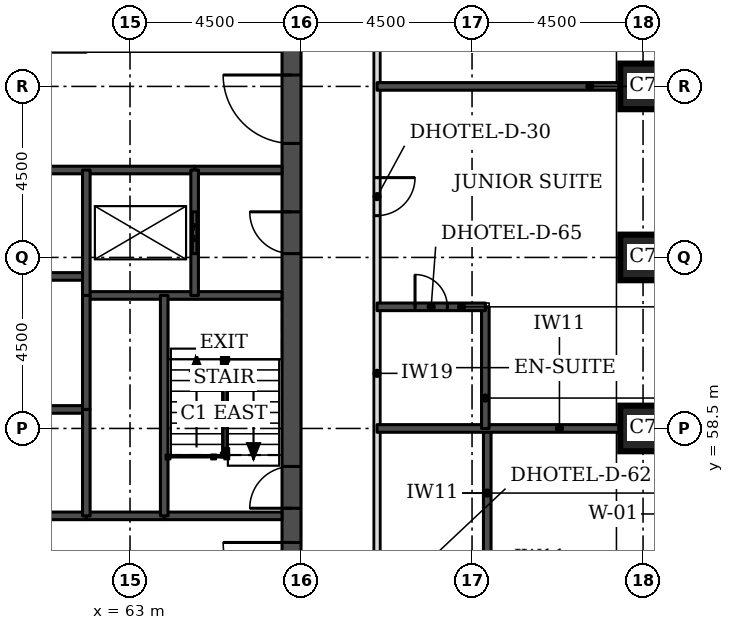
"""IFC4 building model, lengths in metres.
Left out: names, types, materials, properties, quantities, classifications, styles, units other than length and angle.
Written with IfcOpenShell. Run it as: python <this file> out.ifc"""

import sys

from ifc_helpers import new_model, si_unit, direction, frame, frame_2d, origin, origin_2d, place, context, subcontext, project, spatial, rectangle, extrude, element, fill, save


model = new_model("IFC4")
c1 = context("Model", 3, precision=1e-05, world=origin(), true_north=direction((0.0, 1.0)))
c2 = subcontext(c1, "Body", "Model", "MODEL_VIEW")
j1 = project(units=[si_unit("LENGTHUNIT", "METRE"), si_unit("PLANEANGLEUNIT", "RADIAN")], contexts=[c1])
p1 = place(None, origin())
s1 = spatial("IfcSite", under=j1, at=p1, CompositionType="ELEMENT")
p2 = place(p1, origin())
s2 = spatial("IfcBuilding", under=s1, at=p2, CompositionType="ELEMENT")
p3 = place(p2, frame((0.0, 0.0, 59.4)))
s3 = spatial("IfcBuildingStorey", under=s2, at=p3, CompositionType="ELEMENT", Elevation=59.4)
for number, where, z_axis, x_axis in (
    (1, (76.5, 58.5, 0.0), (0.0, 0.0, 1.0), (1.0, 0.0, 0.0)),
    (2, (76.5, 63.0, 0.0), (0.0, 0.0, 1.0), (1.0, 0.0, 0.0)),
    (3, (76.5, 67.5, 0.0), (0.0, 0.0, 1.0), (1.0, 0.0, 0.0)),
):
    element("IfcColumn", number, at=place(p3, frame(where, z_axis=z_axis, x_axis=x_axis)), inside=s3, PredefinedType="COLUMN", context=c2, shape_type="SweptSolid", body=[
        extrude(rectangle(XDim=1.2, YDim=1.2, at=origin_2d()), origin(), (0.0, 0.0, 1.0), 3.3),
    ])
p4 = place(p3, frame((67.25, 49.5, 0.0), z_axis=(0.0, 0.0, 1.0), x_axis=(0.0, 1.0, 0.0)))
e4 = element("IfcWall", 4, at=p4, inside=s3, PredefinedType="SHEAR", context=c2, shape_type="SweptSolid", body=[
    extrude(rectangle(XDim=22.5, YDim=0.5, at=frame_2d((11.25, 0.0))), origin(), (0.0, 0.0, 1.0), 3.3),
])
p5 = place(p4, frame((4.2, 0.0, 0.0)))
e5 = element("IfcOpeningElement", 5, at=p5, cuts=e4, PredefinedType="OPENING", context=c2, shape_type="SweptSolid", body=[
    extrude(rectangle(XDim=1.8, YDim=2.1, at=frame_2d((0.9, 1.05))), frame((0.0, 0.26, 0.0), z_axis=(0.0, -1.0, 0.0), x_axis=(1.0, 0.0, 0.0)), (0.0, 0.0, 1.0), 0.52),
])
p6 = place(p4, frame((6.9, 0.0, 0.0)))
e6 = element("IfcOpeningElement", 6, at=p6, cuts=e4, PredefinedType="OPENING", context=c2, shape_type="SweptSolid", body=[
    extrude(rectangle(XDim=1.1, YDim=2.1, at=frame_2d((0.55, 1.05))), frame((0.0, 0.26, 0.0), z_axis=(0.0, -1.0, 0.0), x_axis=(1.0, 0.0, 0.0)), (0.0, 0.0, 1.0), 0.52),
])
p7 = place(p4, frame((13.6, 0.0, 0.0)))
e7 = element("IfcOpeningElement", 7, at=p7, cuts=e4, PredefinedType="OPENING", context=c2, shape_type="SweptSolid", body=[
    extrude(rectangle(XDim=1.1, YDim=2.1, at=frame_2d((0.55, 1.05))), frame((0.0, 0.26, 0.0), z_axis=(0.0, -1.0, 0.0), x_axis=(1.0, 0.0, 0.0)), (0.0, 0.0, 1.0), 0.52),
])
p8 = place(p4, frame((16.5, 0.0, 0.0)))
e8 = element("IfcOpeningElement", 8, at=p8, cuts=e4, PredefinedType="OPENING", context=c2, shape_type="SweptSolid", body=[
    extrude(rectangle(XDim=1.8, YDim=2.1, at=frame_2d((0.9, 1.05))), frame((0.0, 0.26, 0.0), z_axis=(0.0, -1.0, 0.0), x_axis=(1.0, 0.0, 0.0)), (0.0, 0.0, 1.0), 0.52),
])
p9 = place(p3, frame((69.5, 47.5, 0.0), z_axis=(0.0, 0.0, 1.0), x_axis=(0.0, 1.0, 0.0)))
e9 = element("IfcWall", 9, at=p9, inside=s3, PredefinedType="PARTITIONING", context=c2, shape_type="SweptSolid", body=[
    extrude(rectangle(XDim=26.5, YDim=0.15, at=frame_2d((13.25, 0.0))), origin(), (0.0, 0.0, 1.0), 3.08),
])
p10 = place(p9, frame((22.65, 0.0, 0.0)))
e10 = element("IfcOpeningElement", 10, at=p10, cuts=e9, PredefinedType="OPENING", context=c2, shape_type="SweptSolid", body=[
    extrude(rectangle(XDim=1.0, YDim=2.1, at=frame_2d((0.5, 1.05))), frame((0.0, 0.085, 0.0), z_axis=(0.0, -1.0, 0.0), x_axis=(1.0, 0.0, 0.0)), (0.0, 0.0, 1.0), 0.17),
])
p11 = place(p9, frame((16.6, 0.0, 0.0)))
e11 = element("IfcOpeningElement", 11, at=p11, cuts=e9, PredefinedType="OPENING", context=c2, shape_type="SweptSolid", body=[
    extrude(rectangle(XDim=1.0, YDim=2.1, at=frame_2d((0.5, 1.05))), frame((0.0, 0.085, 0.0), z_axis=(0.0, -1.0, 0.0), x_axis=(1.0, 0.0, 0.0)), (0.0, 0.0, 1.0), 0.17),
])
p12 = place(p9, frame((4.25, 0.0, 0.0)))
e12 = element("IfcOpeningElement", 12, at=p12, cuts=e9, PredefinedType="OPENING", context=c2, shape_type="SweptSolid", body=[
    extrude(rectangle(XDim=1.1, YDim=2.1, at=frame_2d((0.55, 1.05))), frame((0.0, 0.085, 0.0), z_axis=(0.0, -1.0, 0.0), x_axis=(1.0, 0.0, 0.0)), (0.0, 0.0, 1.0), 0.17),
])
p13 = place(p9, frame((0.55, 0.0, 0.0)))
e13 = element("IfcOpeningElement", 13, at=p13, cuts=e9, PredefinedType="OPENING", context=c2, shape_type="SweptSolid", body=[
    extrude(rectangle(XDim=1.0, YDim=2.1, at=frame_2d((0.5, 1.05))), frame((0.0, 0.085, 0.0), z_axis=(0.0, -1.0, 0.0), x_axis=(1.0, 0.0, 0.0)), (0.0, 0.0, 1.0), 0.17),
])
p14 = place(p3, frame((72.4, 55.1, 0.0), z_axis=(0.0, 0.0, 1.0), x_axis=(0.0, 1.0, 0.0)))
e14 = element("IfcWall", 14, at=p14, inside=s3, PredefinedType="SOLIDWALL", context=c2, shape_type="SweptSolid", body=[
    extrude(rectangle(XDim=3.4, YDim=0.2, at=frame_2d((1.7, 0.0))), origin(), (0.0, 0.0, 1.0), 3.08),
])
p15 = place(p3, frame((69.5, 58.5, 0.0), z_axis=(0.0, 0.0, 1.0), x_axis=(1.0, 0.0, 0.0)))
e15 = element("IfcWall", 15, at=p15, inside=s3, PredefinedType="SOLIDWALL", context=c2, shape_type="SweptSolid", body=[
    extrude(rectangle(XDim=6.4, YDim=0.2, at=frame_2d((3.2, 0.0))), origin(), (0.0, 0.0, 1.0), 3.08),
])
p16 = place(p3, frame((72.35, 58.5, 0.0), z_axis=(0.0, 0.0, 1.0), x_axis=(0.0, 1.0, 0.0)))
e16 = element("IfcWall", 16, at=p16, inside=s3, PredefinedType="SOLIDWALL", context=c2, shape_type="SweptSolid", body=[
    extrude(rectangle(XDim=3.2, YDim=0.2, at=frame_2d((1.6, 0.0))), origin(), (0.0, 0.0, 1.0), 3.08),
])
p17 = place(p3, frame((69.5, 61.7, 0.0), z_axis=(0.0, 0.0, 1.0), x_axis=(1.0, 0.0, 0.0)))
e17 = element("IfcWall", 17, at=p17, inside=s3, PredefinedType="SOLIDWALL", context=c2, shape_type="SweptSolid", body=[
    extrude(rectangle(XDim=2.85, YDim=0.2, at=frame_2d((1.425, 0.0))), origin(), (0.0, 0.0, 1.0), 3.08),
])
p18 = place(p17, frame((1.0, 0.0, 0.0)))
e18 = element("IfcOpeningElement", 18, at=p18, cuts=e17, PredefinedType="OPENING", context=c2, shape_type="SweptSolid", body=[
    extrude(rectangle(XDim=0.85, YDim=2.1, at=frame_2d((0.425, 1.05))), frame((0.0, 0.11, 0.0), z_axis=(0.0, -1.0, 0.0), x_axis=(1.0, 0.0, 0.0)), (0.0, 0.0, 1.0), 0.22),
])
p19 = place(p3, frame((69.5, 67.5, 0.0), z_axis=(0.0, 0.0, 1.0), x_axis=(1.0, 0.0, 0.0)))
e19 = element("IfcWall", 19, at=p19, inside=s3, PredefinedType="SOLIDWALL", context=c2, shape_type="SweptSolid", body=[
    extrude(rectangle(XDim=6.4, YDim=0.2, at=frame_2d((3.2, 0.0))), origin(), (0.0, 0.0, 1.0), 3.08),
])
p20 = place(p3, frame((61.85, 56.2, 0.0), z_axis=(0.0, 0.0, 1.0), x_axis=(1.0, 0.0, 0.0)))
e20 = element("IfcWall", 20, at=p20, inside=s3, PredefinedType="SOLIDWALL", context=c2, shape_type="SweptSolid", body=[
    extrude(rectangle(XDim=2.05, YDim=0.2, at=frame_2d((1.025, 0.0))), origin(), (0.0, 0.0, 1.0), 3.08),
])
p21 = place(p3, frame((50.65, 56.2, 0.0), z_axis=(0.0, 0.0, 1.0), x_axis=(1.0, 0.0, 0.0)))
e21 = element("IfcWall", 21, at=p21, inside=s3, PredefinedType="SOLIDWALL", context=c2, shape_type="SweptSolid", body=[
    extrude(rectangle(XDim=11.2, YDim=0.2, at=frame_2d((5.6, 0.0))), origin(), (0.0, 0.0, 1.0), 3.08),
])
p22 = place(p3, frame((63.9, 56.2, 0.0), z_axis=(0.0, 0.0, 1.0), x_axis=(1.0, 0.0, 0.0)))
e22 = element("IfcWall", 22, at=p22, inside=s3, PredefinedType="SOLIDWALL", context=c2, shape_type="SweptSolid", body=[
    extrude(rectangle(XDim=3.1, YDim=0.2, at=frame_2d((1.55, 0.0))), origin(), (0.0, 0.0, 1.0), 3.08),
])
p23 = place(p3, frame((50.65, 59.0, 0.0), z_axis=(0.0, 0.0, 1.0), x_axis=(1.0, 0.0, 0.0)))
e23 = element("IfcWall", 23, at=p23, inside=s3, PredefinedType="SOLIDWALL", context=c2, shape_type="SweptSolid", body=[
    extrude(rectangle(XDim=11.2, YDim=0.2, at=frame_2d((5.6, 0.0))), origin(), (0.0, 0.0, 1.0), 3.3),
])
p24 = place(p3, frame((61.85, 62.0, 0.0), z_axis=(0.0, 0.0, 1.0), x_axis=(1.0, 0.0, 0.0)))
e24 = element("IfcWall", 24, at=p24, inside=s3, PredefinedType="SOLIDWALL", context=c2, shape_type="SweptSolid", body=[
    extrude(rectangle(XDim=5.15, YDim=0.2, at=frame_2d((2.575, 0.0))), origin(), (0.0, 0.0, 1.0), 3.08),
])
p25 = place(p3, frame((50.65, 62.5, 0.0), z_axis=(0.0, 0.0, 1.0), x_axis=(1.0, 0.0, 0.0)))
e25 = element("IfcWall", 25, at=p25, inside=s3, PredefinedType="SOLIDWALL", context=c2, shape_type="SweptSolid", body=[
    extrude(rectangle(XDim=11.2, YDim=0.2, at=frame_2d((5.6, 0.0))), origin(), (0.0, 0.0, 1.0), 3.3),
])
p26 = place(p3, frame((64.7, 65.3, 0.0), z_axis=(0.0, 0.0, 1.0), x_axis=(1.0, 0.0, 0.0)))
e26 = element("IfcWall", 26, at=p26, inside=s3, PredefinedType="SOLIDWALL", context=c2, shape_type="SweptSolid", body=[
    extrude(rectangle(XDim=2.3, YDim=0.2, at=frame_2d((1.15, 0.0))), origin(), (0.0, 0.0, 1.0), 3.08),
])
p27 = place(p3, frame((47.8, 65.3, 0.0), z_axis=(0.0, 0.0, 1.0), x_axis=(1.0, 0.0, 0.0)))
e27 = element("IfcWall", 27, at=p27, inside=s3, PredefinedType="SOLIDWALL", context=c2, shape_type="SweptSolid", body=[
    extrude(rectangle(XDim=16.9, YDim=0.2, at=frame_2d((8.45, 0.0))), origin(), (0.0, 0.0, 1.0), 3.08),
])
p28 = place(p3, frame((61.85, 59.0, 0.0), z_axis=(0.0, 0.0, 1.0), x_axis=(0.0, 1.0, 0.0)))
e28 = element("IfcWall", 28, at=p28, inside=s3, PredefinedType="SOLIDWALL", context=c2, shape_type="SweptSolid", body=[
    extrude(rectangle(XDim=3.0, YDim=0.2, at=frame_2d((1.5, 0.0))), origin(), (0.0, 0.0, 1.0), 3.3),
])
p29 = place(p3, frame((61.85, 56.2, 0.0), z_axis=(0.0, 0.0, 1.0), x_axis=(0.0, 1.0, 0.0)))
e29 = element("IfcWall", 29, at=p29, inside=s3, PredefinedType="SOLIDWALL", context=c2, shape_type="SweptSolid", body=[
    extrude(rectangle(XDim=2.8, YDim=0.2, at=frame_2d((1.4, 0.0))), origin(), (0.0, 0.0, 1.0), 3.08),
])
p30 = place(p3, frame((61.85, 62.0, 0.0), z_axis=(0.0, 0.0, 1.0), x_axis=(0.0, 1.0, 0.0)))
e30 = element("IfcWall", 30, at=p30, inside=s3, PredefinedType="SOLIDWALL", context=c2, shape_type="SweptSolid", body=[
    extrude(rectangle(XDim=3.3, YDim=0.2, at=frame_2d((1.65, 0.0))), origin(), (0.0, 0.0, 1.0), 3.08),
])
p31 = place(p3, frame((63.9, 56.2, 0.0), z_axis=(0.0, 0.0, 1.0), x_axis=(0.0, 1.0, 0.0)))
e31 = element("IfcWall", 31, at=p31, inside=s3, PredefinedType="SOLIDWALL", context=c2, shape_type="SweptSolid", body=[
    extrude(rectangle(XDim=5.8, YDim=0.2, at=frame_2d((2.9, 0.0))), origin(), (0.0, 0.0, 1.0), 3.08),
])
p32 = place(p3, frame((64.7, 62.0, 0.0), z_axis=(0.0, 0.0, 1.0), x_axis=(0.0, 1.0, 0.0)))
e32 = element("IfcWall", 32, at=p32, inside=s3, PredefinedType="SOLIDWALL", context=c2, shape_type="SweptSolid", body=[
    extrude(rectangle(XDim=3.3, YDim=0.2, at=frame_2d((1.65, 0.0))), origin(), (0.0, 0.0, 1.0), 3.08),
])
p33 = place(p32, frame((1.1, 0.0, 0.0)))
e33 = element("IfcOpeningElement", 33, at=p33, cuts=e32, PredefinedType="OPENING", context=c2, shape_type="SweptSolid", body=[
    extrude(rectangle(XDim=1.1, YDim=2.1, at=frame_2d((0.55, 1.05))), frame((0.0, 0.11, 0.0), z_axis=(0.0, -1.0, 0.0), x_axis=(1.0, 0.0, 0.0)), (0.0, 0.0, 1.0), 0.22),
])
p34 = place(p11, frame((1.0, 0.0, 0.0), z_axis=(0.0, 0.0, 1.0), x_axis=(-1.0, 0.0, 0.0)))
e34 = element("IfcDoor", 34, at=p34, inside=s3, OperationType="SINGLE_SWING_LEFT", PredefinedType="DOOR", context=c2, shape_type="SweptSolid", body=[
    extrude(rectangle(XDim=1.0, YDim=2.1, at=frame_2d((0.5, 1.05))), frame((0.0, 0.025, 0.0), z_axis=(0.0, -1.0, 0.0), x_axis=(1.0, 0.0, 0.0)), (0.0, 0.0, 1.0), 0.05),
])
fill(e11, e34)
p35 = place(p18, origin())
e35 = element("IfcDoor", 35, at=p35, inside=s3, OperationType="SINGLE_SWING_LEFT", PredefinedType="DOOR", context=c2, shape_type="SweptSolid", body=[
    extrude(rectangle(XDim=0.85, YDim=2.1, at=frame_2d((0.425, 1.05))), frame((0.0, 0.025, 0.0), z_axis=(0.0, -1.0, 0.0), x_axis=(1.0, 0.0, 0.0)), (0.0, 0.0, 1.0), 0.05),
])
fill(e18, e35)
p36 = place(p33, origin())
e36 = element("IfcDoor", 36, at=p36, inside=s3, OperationType="DOUBLE_DOOR_SLIDING", PredefinedType="DOOR", context=c2, shape_type="SweptSolid", body=[
    extrude(rectangle(XDim=1.1, YDim=2.1, at=frame_2d((0.55, 1.05))), frame((0.0, 0.025, 0.0), z_axis=(0.0, -1.0, 0.0), x_axis=(1.0, 0.0, 0.0)), (0.0, 0.0, 1.0), 0.05),
])
fill(e33, e36)
p37 = place(p5, origin())
e37 = element("IfcDoor", 37, at=p37, inside=s3, OperationType="SINGLE_SWING_RIGHT", PredefinedType="DOOR", context=c2, shape_type="SweptSolid", body=[
    extrude(rectangle(XDim=1.8, YDim=2.1, at=frame_2d((0.9, 1.05))), frame((0.0, 0.025, 0.0), z_axis=(0.0, -1.0, 0.0), x_axis=(1.0, 0.0, 0.0)), (0.0, 0.0, 1.0), 0.05),
])
fill(e5, e37)
p38 = place(p6, origin())
e38 = element("IfcDoor", 38, at=p38, inside=s3, OperationType="SINGLE_SWING_LEFT", PredefinedType="DOOR", context=c2, shape_type="SweptSolid", body=[
    extrude(rectangle(XDim=1.1, YDim=2.1, at=frame_2d((0.55, 1.05))), frame((0.0, 0.025, 0.0), z_axis=(0.0, -1.0, 0.0), x_axis=(1.0, 0.0, 0.0)), (0.0, 0.0, 1.0), 0.05),
])
fill(e6, e38)
p39 = place(p7, origin())
e39 = element("IfcDoor", 39, at=p39, inside=s3, OperationType="SINGLE_SWING_RIGHT", PredefinedType="DOOR", context=c2, shape_type="SweptSolid", body=[
    extrude(rectangle(XDim=1.1, YDim=2.1, at=frame_2d((0.55, 1.05))), frame((0.0, 0.025, 0.0), z_axis=(0.0, -1.0, 0.0), x_axis=(1.0, 0.0, 0.0)), (0.0, 0.0, 1.0), 0.05),
])
fill(e7, e39)
p40 = place(p8, origin())
e40 = element("IfcDoor", 40, at=p40, inside=s3, OperationType="SINGLE_SWING_RIGHT", PredefinedType="DOOR", context=c2, shape_type="SweptSolid", body=[
    extrude(rectangle(XDim=1.8, YDim=2.1, at=frame_2d((0.9, 1.05))), frame((0.0, 0.025, 0.0), z_axis=(0.0, -1.0, 0.0), x_axis=(1.0, 0.0, 0.0)), (0.0, 0.0, 1.0), 0.05),
])
fill(e8, e40)
save(model, sys.argv[1])
